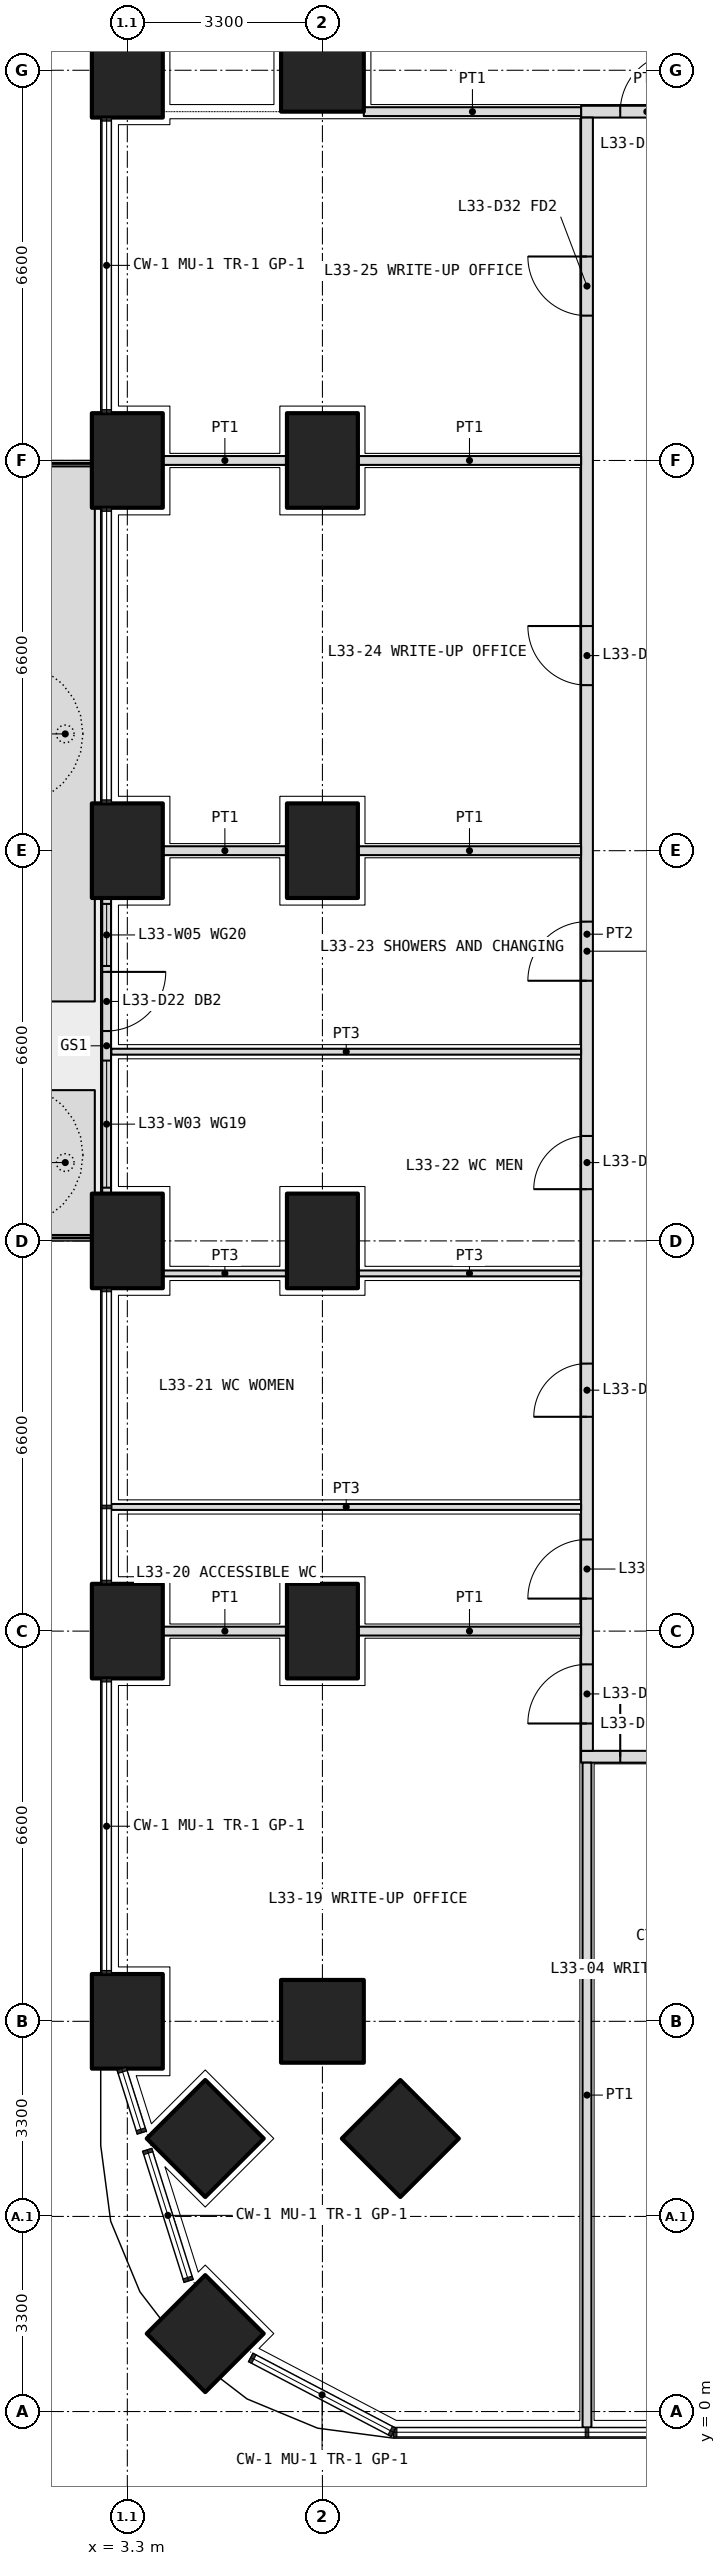
"""IFC4 building model, lengths in metres.
Left out: names, types, materials, properties, quantities, classifications, styles, units other than length and angle.
Written with IfcOpenShell. Run it as: python <this file> out.ifc"""

import sys

from ifc_helpers import new_model, si_unit, direction, frame, frame_2d, origin, origin_2d, place, context, subcontext, project, spatial, polyline, rectangle, outline, extrude, element, fill, save


model = new_model("IFC4")
c1 = context("Model", 3, precision=1e-05, world=origin(), true_north=direction((0.0, 1.0)))
c2 = subcontext(c1, "Body", "Model", "MODEL_VIEW")
j1 = project(units=[si_unit("LENGTHUNIT", "METRE"), si_unit("PLANEANGLEUNIT", "RADIAN")], contexts=[c1])
p1 = place(None, origin())
s1 = spatial("IfcSite", under=j1, at=p1, CompositionType="ELEMENT")
p2 = place(p1, origin())
s2 = spatial("IfcBuilding", under=s1, at=p2, CompositionType="ELEMENT")
p3 = place(p2, frame((0.0, 0.0, 145.2)))
s3 = spatial("IfcBuildingStorey", under=s2, at=p3, CompositionType="ELEMENT", Elevation=145.2)
p4 = place(p3, frame((4.618, 1.318, 0.0), z_axis=(0.0, 0.0, 1.0), x_axis=(0.707106781187, 0.707106781187, 0.0)))
e1 = element("IfcColumn", 1, at=p4, inside=s3, PredefinedType="COLUMN", context=c2, shape_type="SweptSolid", body=[
    extrude(rectangle(XDim=1.4, YDim=1.4, at=origin_2d()), origin(), (0.0, 0.0, 1.0), 4.2),
])
for number, where, z_axis, x_axis in (
    (2, (3.3, 6.6, 0.0), (0.0, 0.0, 1.0), (0.0, 1.0, 0.0)),
    (3, (3.3, 13.2, 0.0), (0.0, 0.0, 1.0), (0.0, 1.0, 0.0)),
    (4, (3.3, 19.8, 0.0), (0.0, 0.0, 1.0), (0.0, 1.0, 0.0)),
    (5, (3.3, 26.4, 0.0), (0.0, 0.0, 1.0), (0.0, 1.0, 0.0)),
    (6, (3.3, 33.0, 0.0), (0.0, 0.0, 1.0), (0.0, 1.0, 0.0)),
    (7, (3.3, 39.6, 0.0), (0.0, 0.0, 1.0), (0.0, 1.0, 0.0)),
):
    element("IfcColumn", number, at=place(p3, frame(where, z_axis=z_axis, x_axis=x_axis)), inside=s3, PredefinedType="COLUMN", context=c2, shape_type="SweptSolid", body=[
        extrude(rectangle(XDim=1.6, YDim=1.2, at=origin_2d()), origin(), (0.0, 0.0, 1.0), 4.2),
    ])
for number, where, z_axis, x_axis in (
    (8, (6.6, 6.6, 0.0), (0.0, 0.0, 1.0), (1.0, 0.0, 0.0)),
    (9, (6.6, 39.6, 0.0), (0.0, 0.0, 1.0), (1.0, 0.0, 0.0)),
    (10, (4.618, 4.618, 0.0), (0.0, 0.0, 1.0), (0.707, 0.707, 0.0)),
    (11, (7.918, 4.618, 0.0), (0.0, 0.0, 1.0), (0.707, 0.707, 0.0)),
):
    element("IfcColumn", number, at=place(p3, frame(where, z_axis=z_axis, x_axis=x_axis)), inside=s3, PredefinedType="COLUMN", context=c2, shape_type="SweptSolid", body=[
        extrude(rectangle(XDim=1.4, YDim=1.4, at=origin_2d()), origin(), (0.0, 0.0, 1.0), 4.2),
    ])
for number, where, z_axis, x_axis in (
    (12, (6.6, 13.2, 0.0), (0.0, 0.0, 1.0), (0.0, 1.0, 0.0)),
    (13, (6.6, 19.8, 0.0), (0.0, 0.0, 1.0), (0.0, 1.0, 0.0)),
    (14, (6.6, 26.4, 0.0), (0.0, 0.0, 1.0), (0.0, 1.0, 0.0)),
    (15, (6.6, 33.0, 0.0), (0.0, 0.0, 1.0), (0.0, 1.0, 0.0)),
):
    element("IfcColumn", number, at=place(p3, frame(where, z_axis=z_axis, x_axis=x_axis)), inside=s3, PredefinedType="COLUMN", context=c2, shape_type="SweptSolid", body=[
        extrude(rectangle(XDim=1.6, YDim=1.2, at=origin_2d()), origin(), (0.0, 0.0, 1.0), 4.2),
    ])
p5 = place(p3, origin())
e16 = element("IfcWall", 16, at=p5, inside=s3, PredefinedType="USERDEFINED", context=c2, shape_type="SweptSolid", body=[
    extrude(outline(polyline([(1.75, 19.9), (2.75, 19.9), (2.75, 22.35), (1.75, 22.35), (1.75, 19.9)]), holes=[polyline([(1.9, 20.05), (2.6, 20.05), (2.6, 22.2), (1.9, 22.2), (1.9, 20.05)])]), origin(), (0.0, 0.0, 1.0), 1.05),
])
p6 = place(p3, origin())
e17 = element("IfcWall", 17, at=p6, inside=s3, PredefinedType="USERDEFINED", context=c2, shape_type="SweptSolid", body=[
    extrude(outline(polyline([(1.75, 23.85), (2.75, 23.85), (2.75, 32.9), (1.75, 32.9), (1.75, 23.85)]), holes=[polyline([(1.9, 24.0), (2.6, 24.0), (2.6, 32.75), (1.9, 32.75), (1.9, 24.0)])]), origin(), (0.0, 0.0, 1.0), 1.05),
])
p7 = place(p3, frame((2.95, 25.6, 0.0), z_axis=(0.0, 0.0, 1.0), x_axis=(0.0, -1.0, 0.0)))
e18 = element("IfcWall", 18, at=p7, inside=s3, PredefinedType="SOLIDWALL", context=c2, shape_type="SweptSolid", body=[
    extrude(rectangle(XDim=5.0, YDim=0.15, at=frame_2d((2.5, 0.0))), origin(), (0.0, 0.0, 1.0), 2.05),
])
p8 = place(p7, frame((1.25, 0.0, 0.0)))
e19 = element("IfcOpeningElement", 19, at=p8, cuts=e18, PredefinedType="OPENING", context=c2, shape_type="SweptSolid", body=[
    extrude(rectangle(XDim=1.0, YDim=2.0, at=frame_2d((0.5, 1.0))), frame((0.0, 0.085, 0.0), z_axis=(0.0, -1.0, 0.0), x_axis=(1.0, 0.0, 0.0)), (0.0, 0.0, 1.0), 0.17),
])
p9 = place(p7, frame((0.1, 0.0, 0.1)))
e20 = element("IfcOpeningElement", 20, at=p9, cuts=e18, PredefinedType="OPENING", context=c2, shape_type="SweptSolid", body=[
    extrude(rectangle(XDim=1.05, YDim=1.65, at=frame_2d((0.525, 0.825))), frame((0.0, 0.085, 0.0), z_axis=(0.0, -1.0, 0.0), x_axis=(1.0, 0.0, 0.0)), (0.0, 0.0, 1.0), 0.17),
])
p10 = place(p7, frame((2.75, 0.0, 0.1)))
e21 = element("IfcOpeningElement", 21, at=p10, cuts=e18, PredefinedType="OPENING", context=c2, shape_type="SweptSolid", body=[
    extrude(rectangle(XDim=2.15, YDim=1.65, at=frame_2d((1.075, 0.825))), frame((0.0, 0.085, 0.0), z_axis=(0.0, -1.0, 0.0), x_axis=(1.0, 0.0, 0.0)), (0.0, 0.0, 1.0), 0.17),
])
p11 = place(p3, frame((10.975, 11.075, 0.0), z_axis=(0.0, 0.0, 1.0), x_axis=(1.0, 0.0, 0.0)))
e22 = element("IfcWall", 22, at=p11, inside=s3, PredefinedType="PARTITIONING", context=c2, shape_type="SweptSolid", body=[
    extrude(rectangle(XDim=30.85, YDim=0.2, at=frame_2d((15.425, 0.0))), origin(), (0.0, 0.0, 1.0), 2.55),
])
p12 = place(p11, frame((0.663, 0.0, 0.0)))
e23 = element("IfcOpeningElement", 23, at=p12, cuts=e22, PredefinedType="OPENING", context=c2, shape_type="SweptSolid", body=[
    extrude(rectangle(XDim=1.0, YDim=2.1, at=frame_2d((0.5, 1.05))), frame((0.0, 0.11, 0.0), z_axis=(0.0, -1.0, 0.0), x_axis=(1.0, 0.0, 0.0)), (0.0, 0.0, 1.0), 0.22),
])
p13 = place(p11, frame((3.825, 0.0, 0.0)))
e24 = element("IfcOpeningElement", 24, at=p13, cuts=e22, PredefinedType="OPENING", context=c2, shape_type="SweptSolid", body=[
    extrude(rectangle(XDim=1.0, YDim=2.1, at=frame_2d((0.5, 1.05))), frame((0.0, 0.11, 0.0), z_axis=(0.0, -1.0, 0.0), x_axis=(1.0, 0.0, 0.0)), (0.0, 0.0, 1.0), 0.22),
])
p14 = place(p11, frame((7.125, 0.0, 0.0)))
e25 = element("IfcOpeningElement", 25, at=p14, cuts=e22, PredefinedType="OPENING", context=c2, shape_type="SweptSolid", body=[
    extrude(rectangle(XDim=1.0, YDim=2.1, at=frame_2d((0.5, 1.05))), frame((0.0, 0.11, 0.0), z_axis=(0.0, -1.0, 0.0), x_axis=(1.0, 0.0, 0.0)), (0.0, 0.0, 1.0), 0.22),
])
p15 = place(p11, frame((19.188, 0.0, 0.0)))
e26 = element("IfcOpeningElement", 26, at=p15, cuts=e22, PredefinedType="OPENING", context=c2, shape_type="SweptSolid", body=[
    extrude(rectangle(XDim=1.2, YDim=2.1, at=frame_2d((0.6, 1.05))), frame((0.0, 0.11, 0.0), z_axis=(0.0, -1.0, 0.0), x_axis=(1.0, 0.0, 0.0)), (0.0, 0.0, 1.0), 0.22),
])
p16 = place(p3, frame((10.975, 38.9, 0.0), z_axis=(0.0, 0.0, 1.0), x_axis=(1.0, 0.0, 0.0)))
e27 = element("IfcWall", 27, at=p16, inside=s3, PredefinedType="PARTITIONING", context=c2, shape_type="SweptSolid", body=[
    extrude(rectangle(XDim=2.225, YDim=0.2, at=frame_2d((1.112, 0.0))), origin(), (0.0, 0.0, 1.0), 2.55),
])
p17 = place(p16, frame((0.663, 0.0, 0.0)))
e28 = element("IfcOpeningElement", 28, at=p17, cuts=e27, PredefinedType="OPENING", context=c2, shape_type="SweptSolid", body=[
    extrude(rectangle(XDim=1.0, YDim=2.1, at=frame_2d((0.5, 1.05))), frame((0.0, 0.11, 0.0), z_axis=(0.0, -1.0, 0.0), x_axis=(1.0, 0.0, 0.0)), (0.0, 0.0, 1.0), 0.22),
])
p18 = place(p3, frame((11.075, 11.175, 0.0), z_axis=(0.0, 0.0, 1.0), x_axis=(0.0, 1.0, 0.0)))
e29 = element("IfcWall", 29, at=p18, inside=s3, PredefinedType="PARTITIONING", context=c2, shape_type="SweptSolid", body=[
    extrude(rectangle(XDim=27.625, YDim=0.2, at=frame_2d((13.812, 0.0))), origin(), (0.0, 0.0, 1.0), 2.55),
])
p19 = place(p18, frame((0.462, 0.0, 0.0)))
e30 = element("IfcOpeningElement", 30, at=p19, cuts=e29, PredefinedType="OPENING", context=c2, shape_type="SweptSolid", body=[
    extrude(rectangle(XDim=1.0, YDim=2.1, at=frame_2d((0.5, 1.05))), frame((0.0, 0.11, 0.0), z_axis=(0.0, -1.0, 0.0), x_axis=(1.0, 0.0, 0.0)), (0.0, 0.0, 1.0), 0.22),
])
p20 = place(p18, frame((2.575, 0.0, 0.0)))
e31 = element("IfcOpeningElement", 31, at=p20, cuts=e29, PredefinedType="OPENING", context=c2, shape_type="SweptSolid", body=[
    extrude(rectangle(XDim=1.0, YDim=2.1, at=frame_2d((0.5, 1.05))), frame((0.0, 0.11, 0.0), z_axis=(0.0, -1.0, 0.0), x_axis=(1.0, 0.0, 0.0)), (0.0, 0.0, 1.0), 0.22),
])
p21 = place(p18, frame((5.65, 0.0, 0.0)))
e32 = element("IfcOpeningElement", 32, at=p21, cuts=e29, PredefinedType="OPENING", context=c2, shape_type="SweptSolid", body=[
    extrude(rectangle(XDim=0.9, YDim=2.1, at=frame_2d((0.45, 1.05))), frame((0.0, 0.11, 0.0), z_axis=(0.0, -1.0, 0.0), x_axis=(1.0, 0.0, 0.0)), (0.0, 0.0, 1.0), 0.22),
])
p22 = place(p18, frame((9.5, 0.0, 0.0)))
e33 = element("IfcOpeningElement", 33, at=p22, cuts=e29, PredefinedType="OPENING", context=c2, shape_type="SweptSolid", body=[
    extrude(rectangle(XDim=0.9, YDim=2.1, at=frame_2d((0.45, 1.05))), frame((0.0, 0.11, 0.0), z_axis=(0.0, -1.0, 0.0), x_axis=(1.0, 0.0, 0.0)), (0.0, 0.0, 1.0), 0.22),
])
p23 = place(p18, frame((13.025, 0.0, 0.0)))
e34 = element("IfcOpeningElement", 34, at=p23, cuts=e29, PredefinedType="OPENING", context=c2, shape_type="SweptSolid", body=[
    extrude(rectangle(XDim=1.0, YDim=2.1, at=frame_2d((0.5, 1.05))), frame((0.0, 0.11, 0.0), z_axis=(0.0, -1.0, 0.0), x_axis=(1.0, 0.0, 0.0)), (0.0, 0.0, 1.0), 0.22),
])
p24 = place(p18, frame((18.025, 0.0, 0.0)))
e35 = element("IfcOpeningElement", 35, at=p24, cuts=e29, PredefinedType="OPENING", context=c2, shape_type="SweptSolid", body=[
    extrude(rectangle(XDim=1.0, YDim=2.1, at=frame_2d((0.5, 1.05))), frame((0.0, 0.11, 0.0), z_axis=(0.0, -1.0, 0.0), x_axis=(1.0, 0.0, 0.0)), (0.0, 0.0, 1.0), 0.22),
])
p25 = place(p18, frame((24.275, 0.0, 0.0)))
e36 = element("IfcOpeningElement", 36, at=p25, cuts=e29, PredefinedType="OPENING", context=c2, shape_type="SweptSolid", body=[
    extrude(rectangle(XDim=1.0, YDim=2.1, at=frame_2d((0.5, 1.05))), frame((0.0, 0.11, 0.0), z_axis=(0.0, -1.0, 0.0), x_axis=(1.0, 0.0, 0.0)), (0.0, 0.0, 1.0), 0.22),
])
p26 = place(p3, frame((11.075, -0.27, 0.0), z_axis=(0.0, 0.0, 1.0), x_axis=(0.0, 1.0, 0.0)))
e37 = element("IfcWall", 37, at=p26, inside=s3, PredefinedType="PARTITIONING", context=c2, shape_type="SweptSolid", body=[
    extrude(rectangle(XDim=11.245, YDim=0.15, at=frame_2d((5.623, 0.0))), origin(), (0.0, 0.0, 1.0), 3.85),
])
p27 = place(p3, frame((7.3, 38.9, 0.0), z_axis=(0.0, 0.0, 1.0), x_axis=(1.0, 0.0, 0.0)))
e38 = element("IfcWall", 38, at=p27, inside=s3, PredefinedType="PARTITIONING", context=c2, shape_type="SweptSolid", body=[
    extrude(rectangle(XDim=3.675, YDim=0.15, at=frame_2d((1.837, 0.0))), origin(), (0.0, 0.0, 1.0), 2.55),
])
p28 = place(p3, frame((3.03, 15.3, 0.0), z_axis=(0.0, 0.0, 1.0), x_axis=(1.0, 0.0, 0.0)))
e39 = element("IfcWall", 39, at=p28, inside=s3, PredefinedType="PARTITIONING", context=c2, shape_type="SweptSolid", body=[
    extrude(rectangle(XDim=7.945, YDim=0.1, at=frame_2d((3.973, 0.0))), origin(), (0.0, 0.0, 1.0), 3.85),
])
p29 = place(p3, frame((3.9, 19.25, 0.0), z_axis=(0.0, 0.0, 1.0), x_axis=(1.0, 0.0, 0.0)))
e40 = element("IfcWall", 40, at=p29, inside=s3, PredefinedType="PARTITIONING", context=c2, shape_type="SweptSolid", body=[
    extrude(rectangle(XDim=2.1, YDim=0.1, at=frame_2d((1.05, 0.0))), origin(), (0.0, 0.0, 1.0), 2.55),
])
p30 = place(p3, frame((7.2, 19.25, 0.0), z_axis=(0.0, 0.0, 1.0), x_axis=(1.0, 0.0, 0.0)))
e41 = element("IfcWall", 41, at=p30, inside=s3, PredefinedType="PARTITIONING", context=c2, shape_type="SweptSolid", body=[
    extrude(rectangle(XDim=3.775, YDim=0.1, at=frame_2d((1.888, 0.0))), origin(), (0.0, 0.0, 1.0), 2.55),
])
p31 = place(p3, frame((3.03, 23.0, 0.0), z_axis=(0.0, 0.0, 1.0), x_axis=(1.0, 0.0, 0.0)))
e42 = element("IfcWall", 42, at=p31, inside=s3, PredefinedType="PARTITIONING", context=c2, shape_type="SweptSolid", body=[
    extrude(rectangle(XDim=7.945, YDim=0.1, at=frame_2d((3.973, 0.0))), origin(), (0.0, 0.0, 1.0), 3.85),
])
p32 = place(p3, frame((3.9, 13.2, 0.0), z_axis=(0.0, 0.0, 1.0), x_axis=(1.0, 0.0, 0.0)))
e43 = element("IfcWall", 43, at=p32, inside=s3, PredefinedType="PARTITIONING", context=c2, shape_type="SweptSolid", body=[
    extrude(rectangle(XDim=2.1, YDim=0.15, at=frame_2d((1.05, 0.0))), origin(), (0.0, 0.0, 1.0), 2.55),
])
p33 = place(p3, frame((7.2, 13.2, 0.0), z_axis=(0.0, 0.0, 1.0), x_axis=(1.0, 0.0, 0.0)))
e44 = element("IfcWall", 44, at=p33, inside=s3, PredefinedType="PARTITIONING", context=c2, shape_type="SweptSolid", body=[
    extrude(rectangle(XDim=3.775, YDim=0.15, at=frame_2d((1.888, 0.0))), origin(), (0.0, 0.0, 1.0), 2.55),
])
p34 = place(p3, frame((3.9, 26.4, 0.0), z_axis=(0.0, 0.0, 1.0), x_axis=(1.0, 0.0, 0.0)))
e45 = element("IfcWall", 45, at=p34, inside=s3, PredefinedType="PARTITIONING", context=c2, shape_type="SweptSolid", body=[
    extrude(rectangle(XDim=2.1, YDim=0.15, at=frame_2d((1.05, 0.0))), origin(), (0.0, 0.0, 1.0), 2.55),
])
p35 = place(p3, frame((7.2, 26.4, 0.0), z_axis=(0.0, 0.0, 1.0), x_axis=(1.0, 0.0, 0.0)))
e46 = element("IfcWall", 46, at=p35, inside=s3, PredefinedType="PARTITIONING", context=c2, shape_type="SweptSolid", body=[
    extrude(rectangle(XDim=3.775, YDim=0.15, at=frame_2d((1.888, 0.0))), origin(), (0.0, 0.0, 1.0), 2.55),
])
p36 = place(p3, frame((3.9, 33.0, 0.0), z_axis=(0.0, 0.0, 1.0), x_axis=(1.0, 0.0, 0.0)))
e47 = element("IfcWall", 47, at=p36, inside=s3, PredefinedType="PARTITIONING", context=c2, shape_type="SweptSolid", body=[
    extrude(rectangle(XDim=2.1, YDim=0.15, at=frame_2d((1.05, 0.0))), origin(), (0.0, 0.0, 1.0), 2.55),
])
p37 = place(p3, frame((7.2, 33.0, 0.0), z_axis=(0.0, 0.0, 1.0), x_axis=(1.0, 0.0, 0.0)))
e48 = element("IfcWall", 48, at=p37, inside=s3, PredefinedType="PARTITIONING", context=c2, shape_type="SweptSolid", body=[
    extrude(rectangle(XDim=3.775, YDim=0.15, at=frame_2d((1.888, 0.0))), origin(), (0.0, 0.0, 1.0), 2.55),
])
p38 = place(p8, origin())
e49 = element("IfcDoor", 49, at=p38, inside=s3, OperationType="SINGLE_SWING_LEFT", PredefinedType="DOOR", context=c2, shape_type="SweptSolid", body=[
    extrude(rectangle(XDim=1.0, YDim=2.0, at=frame_2d((0.5, 1.0))), frame((0.0, 0.025, 0.0), z_axis=(0.0, -1.0, 0.0), x_axis=(1.0, 0.0, 0.0)), (0.0, 0.0, 1.0), 0.05),
])
fill(e19, e49)
p39 = place(p9, origin())
e50 = element("IfcWindow", 50, at=p39, inside=s3, PartitioningType="SINGLE_PANEL", PredefinedType="WINDOW", context=c2, shape_type="SweptSolid", body=[
    extrude(rectangle(XDim=1.05, YDim=1.65, at=frame_2d((0.525, 0.825))), frame((0.0, 0.03, 0.0), z_axis=(0.0, -1.0, 0.0), x_axis=(1.0, 0.0, 0.0)), (0.0, 0.0, 1.0), 0.06),
])
fill(e20, e50)
p40 = place(p10, origin())
e51 = element("IfcWindow", 51, at=p40, inside=s3, PartitioningType="SINGLE_PANEL", PredefinedType="WINDOW", context=c2, shape_type="SweptSolid", body=[
    extrude(rectangle(XDim=2.15, YDim=1.65, at=frame_2d((1.075, 0.825))), frame((0.0, 0.03, 0.0), z_axis=(0.0, -1.0, 0.0), x_axis=(1.0, 0.0, 0.0)), (0.0, 0.0, 1.0), 0.06),
])
fill(e21, e51)
p41 = place(p12, origin())
e52 = element("IfcDoor", 52, at=p41, inside=s3, OperationType="SINGLE_SWING_LEFT", PredefinedType="DOOR", context=c2, shape_type="SweptSolid", body=[
    extrude(rectangle(XDim=1.0, YDim=2.1, at=frame_2d((0.5, 1.05))), frame((0.0, 0.025, 0.0), z_axis=(0.0, -1.0, 0.0), x_axis=(1.0, 0.0, 0.0)), (0.0, 0.0, 1.0), 0.05),
])
fill(e23, e52)
p42 = place(p17, origin())
e53 = element("IfcDoor", 53, at=p42, inside=s3, OperationType="SINGLE_SWING_RIGHT", PredefinedType="DOOR", context=c2, shape_type="SweptSolid", body=[
    extrude(rectangle(XDim=1.0, YDim=2.1, at=frame_2d((0.5, 1.05))), frame((0.0, 0.025, 0.0), z_axis=(0.0, -1.0, 0.0), x_axis=(1.0, 0.0, 0.0)), (0.0, 0.0, 1.0), 0.05),
])
fill(e28, e53)
p43 = place(p19, origin())
e54 = element("IfcDoor", 54, at=p43, inside=s3, OperationType="SINGLE_SWING_LEFT", PredefinedType="DOOR", context=c2, shape_type="SweptSolid", body=[
    extrude(rectangle(XDim=1.0, YDim=2.1, at=frame_2d((0.5, 1.05))), frame((0.0, 0.025, 0.0), z_axis=(0.0, -1.0, 0.0), x_axis=(1.0, 0.0, 0.0)), (0.0, 0.0, 1.0), 0.05),
])
fill(e30, e54)
p44 = place(p20, origin())
e55 = element("IfcDoor", 55, at=p44, inside=s3, OperationType="SINGLE_SWING_LEFT", PredefinedType="DOOR", context=c2, shape_type="SweptSolid", body=[
    extrude(rectangle(XDim=1.0, YDim=2.1, at=frame_2d((0.5, 1.05))), frame((0.0, 0.025, 0.0), z_axis=(0.0, -1.0, 0.0), x_axis=(1.0, 0.0, 0.0)), (0.0, 0.0, 1.0), 0.05),
])
fill(e31, e55)
p45 = place(p21, origin())
e56 = element("IfcDoor", 56, at=p45, inside=s3, OperationType="SINGLE_SWING_LEFT", PredefinedType="DOOR", context=c2, shape_type="SweptSolid", body=[
    extrude(rectangle(XDim=0.9, YDim=2.1, at=frame_2d((0.45, 1.05))), frame((0.0, 0.025, 0.0), z_axis=(0.0, -1.0, 0.0), x_axis=(1.0, 0.0, 0.0)), (0.0, 0.0, 1.0), 0.05),
])
fill(e32, e56)
p46 = place(p22, origin())
e57 = element("IfcDoor", 57, at=p46, inside=s3, OperationType="SINGLE_SWING_LEFT", PredefinedType="DOOR", context=c2, shape_type="SweptSolid", body=[
    extrude(rectangle(XDim=0.9, YDim=2.1, at=frame_2d((0.45, 1.05))), frame((0.0, 0.025, 0.0), z_axis=(0.0, -1.0, 0.0), x_axis=(1.0, 0.0, 0.0)), (0.0, 0.0, 1.0), 0.05),
])
fill(e33, e57)
p47 = place(p23, origin())
e58 = element("IfcDoor", 58, at=p47, inside=s3, OperationType="SINGLE_SWING_LEFT", PredefinedType="DOOR", context=c2, shape_type="SweptSolid", body=[
    extrude(rectangle(XDim=1.0, YDim=2.1, at=frame_2d((0.5, 1.05))), frame((0.0, 0.025, 0.0), z_axis=(0.0, -1.0, 0.0), x_axis=(1.0, 0.0, 0.0)), (0.0, 0.0, 1.0), 0.05),
])
fill(e34, e58)
p48 = place(p24, origin())
e59 = element("IfcDoor", 59, at=p48, inside=s3, OperationType="SINGLE_SWING_RIGHT", PredefinedType="DOOR", context=c2, shape_type="SweptSolid", body=[
    extrude(rectangle(XDim=1.0, YDim=2.1, at=frame_2d((0.5, 1.05))), frame((0.0, 0.025, 0.0), z_axis=(0.0, -1.0, 0.0), x_axis=(1.0, 0.0, 0.0)), (0.0, 0.0, 1.0), 0.05),
])
fill(e35, e59)
p49 = place(p25, origin())
e60 = element("IfcDoor", 60, at=p49, inside=s3, OperationType="SINGLE_SWING_RIGHT", PredefinedType="DOOR", context=c2, shape_type="SweptSolid", body=[
    extrude(rectangle(XDim=1.0, YDim=2.1, at=frame_2d((0.5, 1.05))), frame((0.0, 0.025, 0.0), z_axis=(0.0, -1.0, 0.0), x_axis=(1.0, 0.0, 0.0)), (0.0, 0.0, 1.0), 0.05),
])
fill(e36, e60)
save(model, sys.argv[1])
